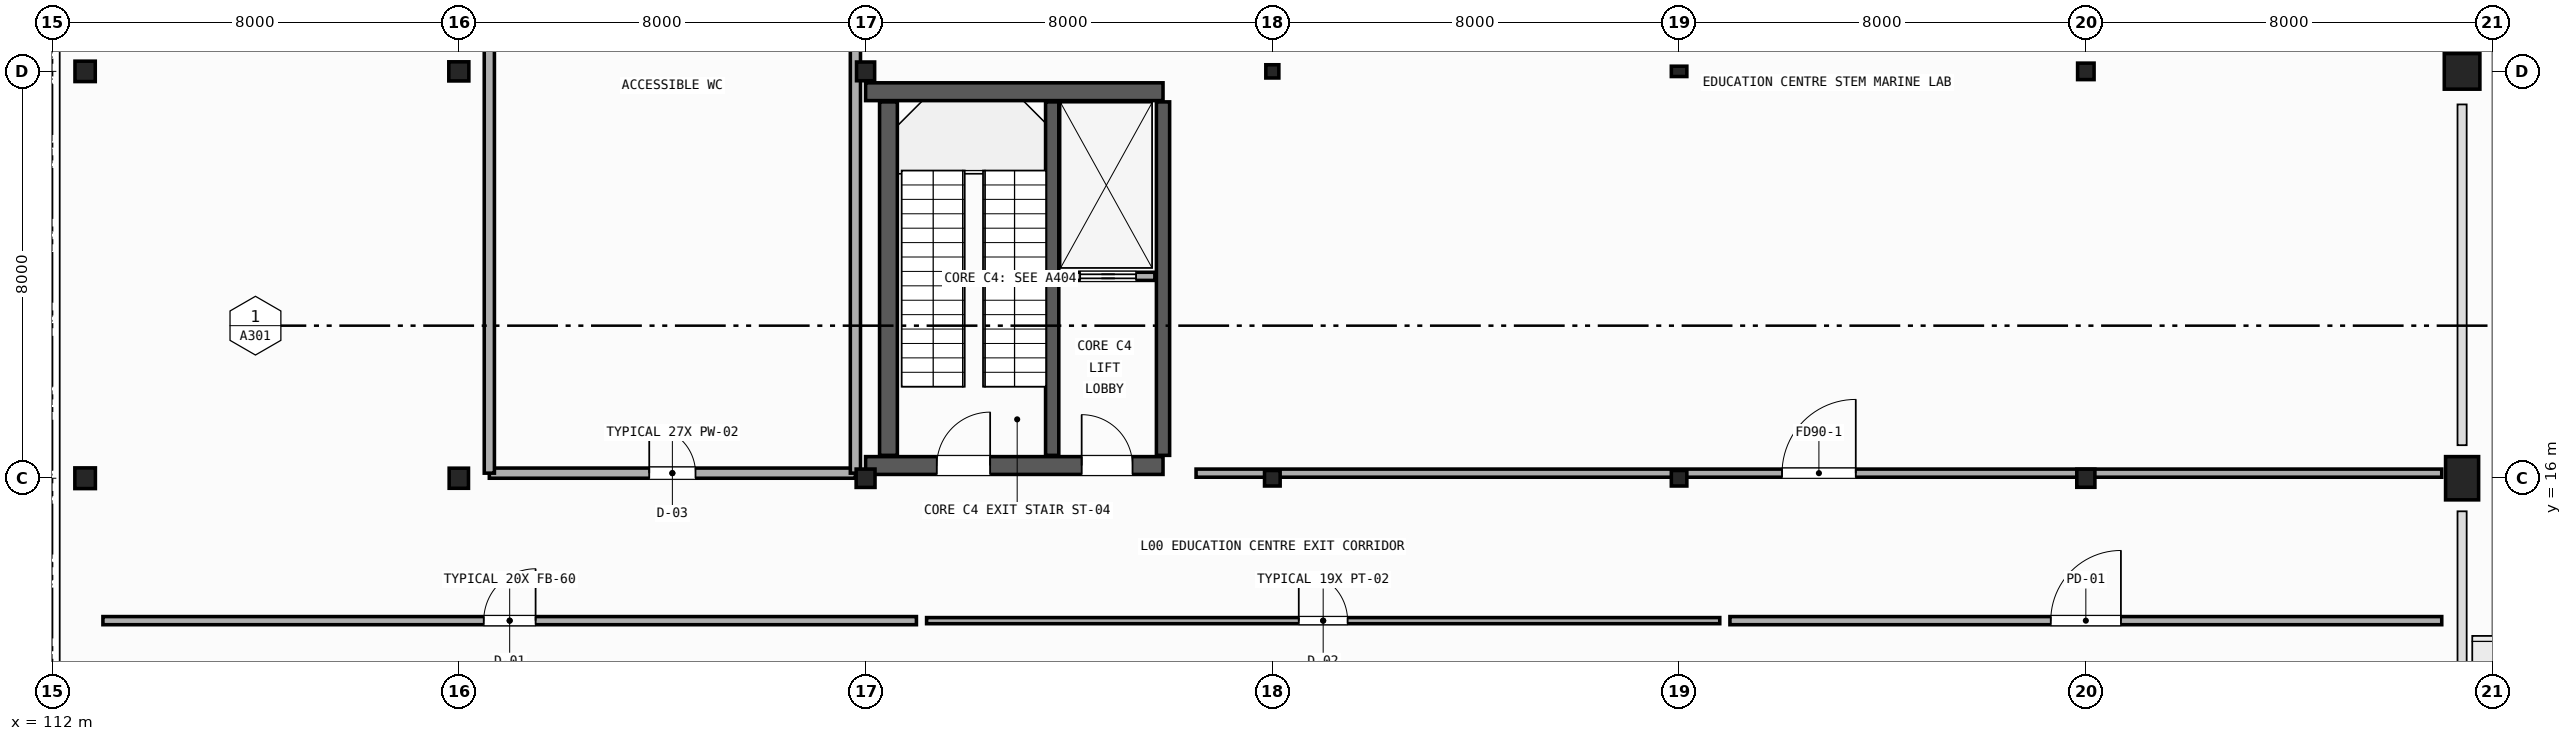
"""IFC4 building model, lengths in metres.
Left out: names, types, materials, properties, quantities, classifications, styles, units other than length and angle.
Written with IfcOpenShell. Run it as: python <this file> out.ifc"""

import sys

from ifc_helpers import new_model, si_unit, direction, frame, frame_2d, origin, origin_2d, place, context, subcontext, project, spatial, rectangle, hollow_rectangle, hollow_circle, i_section, extrude, element, fill, save


model = new_model("IFC4")
c1 = context("Model", 3, precision=1e-05, world=origin(), true_north=direction((0.0, 1.0)))
c2 = subcontext(c1, "Body", "Model", "MODEL_VIEW")
j1 = project(units=[si_unit("LENGTHUNIT", "METRE"), si_unit("PLANEANGLEUNIT", "RADIAN")], contexts=[c1])
p1 = place(None, origin())
s1 = spatial("IfcSite", under=j1, at=p1, CompositionType="ELEMENT")
p2 = place(p1, origin())
s2 = spatial("IfcBuilding", under=s1, at=p2, CompositionType="ELEMENT")
p3 = place(p2, origin())
s3 = spatial("IfcBuildingStorey", under=s2, at=p3, CompositionType="ELEMENT", Elevation=0.0)
p4 = place(p3, frame((112.65, 16.0, 0.0), z_axis=(0.0, 0.0, 1.0), x_axis=(1.0, 0.0, 0.0)))
e1 = element("IfcColumn", 1, at=p4, inside=s3, PredefinedType="COLUMN", context=c2, shape_type="SweptSolid", body=[
    extrude(i_section(OverallWidth=0.404, OverallDepth=0.407, WebThickness=0.027, FlangeThickness=0.044, FilletRadius=0.015, at=origin_2d()), origin(), (0.0, 0.0, 1.0), 5.12),
])
p5 = place(p3, frame((112.65, 24.0, 0.0), z_axis=(0.0, 0.0, 1.0), x_axis=(0.0, 1.0, 0.0)))
e2 = element("IfcColumn", 2, at=p5, inside=s3, PredefinedType="COLUMN", context=c2, shape_type="SweptSolid", body=[
    extrude(i_section(OverallWidth=0.401, OverallDepth=0.399, WebThickness=0.025, FlangeThickness=0.04, FilletRadius=0.015, at=origin_2d()), origin(), (0.0, 0.0, 1.0), 5.12),
])
p6 = place(p3, frame((120.0, 16.0, 0.0), z_axis=(0.0, 0.0, 1.0), x_axis=(0.0, 1.0, 0.0)))
e3 = element("IfcColumn", 3, at=p6, inside=s3, PredefinedType="COLUMN", context=c2, shape_type="SweptSolid", body=[
    extrude(i_section(OverallWidth=0.395, OverallDepth=0.38, WebThickness=0.019, FlangeThickness=0.03, FilletRadius=0.015, at=origin_2d()), origin(), (0.0, 0.0, 1.0), 5.12),
])
p7 = place(p3, frame((120.0, 24.0, 0.0), z_axis=(0.0, 0.0, 1.0), x_axis=(1.0, 0.0, 0.0)))
e4 = element("IfcColumn", 4, at=p7, inside=s3, PredefinedType="COLUMN", context=c2, shape_type="SweptSolid", body=[
    extrude(i_section(OverallWidth=0.394, OverallDepth=0.376, WebThickness=0.017, FlangeThickness=0.028, FilletRadius=0.015, at=origin_2d()), origin(), (0.0, 0.0, 1.0), 5.12),
])
p8 = place(p3, frame((128.0, 16.0, 0.0), z_axis=(0.0, 0.0, 1.0), x_axis=(1.0, 0.0, 0.0)))
e5 = element("IfcColumn", 5, at=p8, inside=s3, PredefinedType="COLUMN", context=c2, shape_type="SweptSolid", body=[
    extrude(i_section(OverallWidth=0.371, OverallDepth=0.361, WebThickness=0.012, FlangeThickness=0.02, FilletRadius=0.015, at=origin_2d()), origin(), (0.0, 0.0, 1.0), 5.12),
])
p9 = place(p3, frame((128.0, 24.0, 0.0), z_axis=(0.0, 0.0, 1.0), x_axis=(0.0, 1.0, 0.0)))
e6 = element("IfcColumn", 6, at=p9, inside=s3, PredefinedType="COLUMN", context=c2, shape_type="SweptSolid", body=[
    extrude(i_section(OverallWidth=0.368, OverallDepth=0.356, WebThickness=0.011, FlangeThickness=0.018, FilletRadius=0.015, at=origin_2d()), origin(), (0.0, 0.0, 1.0), 5.12),
])
p10 = place(p3, frame((136.0, 16.0, 0.0), z_axis=(0.0, 0.0, 1.0), x_axis=(0.0, 1.0, 0.0)))
e7 = element("IfcColumn", 7, at=p10, inside=s3, PredefinedType="COLUMN", context=c2, shape_type="SweptSolid", body=[
    extrude(i_section(OverallWidth=0.305, OverallDepth=0.307, WebThickness=0.01, FlangeThickness=0.015, FilletRadius=0.013, at=origin_2d()), origin(), (0.0, 0.0, 1.0), 5.12),
])
p11 = place(p3, frame((136.0, 24.0, 0.0), z_axis=(0.0, 0.0, 1.0), x_axis=(1.0, 0.0, 0.0)))
e8 = element("IfcColumn", 8, at=p11, inside=s3, PredefinedType="COLUMN", context=c2, shape_type="SweptSolid", body=[
    extrude(i_section(OverallWidth=0.256, OverallDepth=0.26, WebThickness=0.011, FlangeThickness=0.017, FilletRadius=0.011, at=origin_2d()), origin(), (0.0, 0.0, 1.0), 5.12),
])
p12 = place(p3, frame((144.0, 16.0, 0.0), z_axis=(0.0, 0.0, 1.0), x_axis=(1.0, 0.0, 0.0)))
e9 = element("IfcColumn", 9, at=p12, inside=s3, PredefinedType="COLUMN", context=c2, shape_type="SweptSolid", body=[
    extrude(hollow_rectangle(XDim=0.305, YDim=0.305, WallThickness=0.012, InnerFilletRadius=0.012, OuterFilletRadius=0.024, at=origin_2d()), origin(), (0.0, 0.0, 1.0), 5.12),
])
p13 = place(p3, frame((144.0, 24.0, 0.0), z_axis=(0.0, 0.0, 1.0), x_axis=(0.0, 1.0, 0.0)))
e10 = element("IfcColumn", 10, at=p13, inside=s3, PredefinedType="COLUMN", context=c2, shape_type="SweptSolid", body=[
    extrude(hollow_rectangle(XDim=0.203, YDim=0.305, WallThickness=0.009, InnerFilletRadius=0.009, OuterFilletRadius=0.018, at=origin_2d()), origin(), (0.0, 0.0, 1.0), 5.12),
])
p14 = place(p3, frame((152.0, 16.0, 0.0), z_axis=(0.0, 0.0, 1.0), x_axis=(0.0, 1.0, 0.0)))
e11 = element("IfcColumn", 11, at=p14, inside=s3, PredefinedType="COLUMN", context=c2, shape_type="SweptSolid", body=[
    extrude(hollow_circle(Radius=0.178, WallThickness=0.012, at=origin_2d()), origin(), (0.0, 0.0, 1.0), 5.12),
])
p15 = place(p3, frame((152.0, 24.0, 0.0), z_axis=(0.0, 0.0, 1.0), x_axis=(1.0, 0.0, 0.0)))
e12 = element("IfcColumn", 12, at=p15, inside=s3, PredefinedType="COLUMN", context=c2, shape_type="SweptSolid", body=[
    extrude(hollow_circle(Radius=0.162, WallThickness=0.012, at=origin_2d()), origin(), (0.0, 0.0, 1.0), 5.12),
])
p16 = place(p3, frame((159.4, 16.0, 0.0), z_axis=(0.0, 0.0, 1.0), x_axis=(1.0, 0.0, 0.0)))
e13 = element("IfcColumn", 13, at=p16, inside=s3, PredefinedType="PILASTER", context=c2, shape_type="SweptSolid", body=[
    extrude(rectangle(XDim=0.65, YDim=0.85, at=origin_2d()), origin(), (0.0, 0.0, 1.0), 5.12),
])
p17 = place(p3, frame((159.4, 24.0, 0.0), z_axis=(0.0, 0.0, 1.0), x_axis=(0.0, 1.0, 0.0)))
e14 = element("IfcColumn", 14, at=p17, inside=s3, PredefinedType="COLUMN", context=c2, shape_type="SweptSolid", body=[
    extrude(rectangle(XDim=0.7, YDim=0.7, at=origin_2d()), origin(), (0.0, 0.0, 1.0), 5.12),
])
p18 = place(p3, frame((128.0, 16.25, 0.0), z_axis=(0.0, 0.0, 1.0), x_axis=(1.0, 0.0, 0.0)))
e15 = element("IfcWall", 15, at=p18, inside=s3, PredefinedType="SHEAR", context=c2, shape_type="SweptSolid", body=[
    extrude(rectangle(XDim=5.85, YDim=0.35, at=frame_2d((2.925, 0.0))), origin(), (0.0, 0.0, 1.0), 5.11),
])
p19 = place(p18, frame((1.4, 0.0, 0.0)))
e16 = element("IfcOpeningElement", 16, at=p19, cuts=e15, PredefinedType="OPENING", context=c2, shape_type="SweptSolid", body=[
    extrude(rectangle(XDim=1.05, YDim=2.1, at=frame_2d((0.525, 1.05))), frame((0.0, 0.185, 0.0), z_axis=(0.0, -1.0, 0.0), x_axis=(1.0, 0.0, 0.0)), (0.0, 0.0, 1.0), 0.37),
])
p20 = place(p18, frame((4.25, 0.0, 0.0)))
e17 = element("IfcOpeningElement", 17, at=p20, cuts=e15, PredefinedType="OPENING", context=c2, shape_type="SweptSolid", body=[
    extrude(rectangle(XDim=1.0, YDim=2.15, at=frame_2d((0.5, 1.075))), frame((0.0, 0.185, 0.0), z_axis=(0.0, -1.0, 0.0), x_axis=(1.0, 0.0, 0.0)), (0.0, 0.0, 1.0), 0.37),
])
p21 = place(p3, frame((128.0, 23.6, 0.0), z_axis=(0.0, 0.0, 1.0), x_axis=(1.0, 0.0, 0.0)))
e18 = element("IfcWall", 18, at=p21, inside=s3, PredefinedType="SHEAR", context=c2, shape_type="SweptSolid", body=[
    extrude(rectangle(XDim=5.85, YDim=0.35, at=frame_2d((2.925, 0.0))), origin(), (0.0, 0.0, 1.0), 5.11),
])
p22 = place(p3, frame((128.45, 16.45, 0.0), z_axis=(0.0, 0.0, 1.0), x_axis=(0.0, 1.0, 0.0)))
e19 = element("IfcWall", 19, at=p22, inside=s3, PredefinedType="SHEAR", context=c2, shape_type="SweptSolid", body=[
    extrude(rectangle(XDim=6.95, YDim=0.35, at=frame_2d((3.475, 0.0))), origin(), (0.0, 0.0, 1.0), 5.11),
])
for number, where, z_axis, x_axis in (
    (20, (133.85, 16.45, 0.0), (0.0, 0.0, 1.0), (0.0, 1.0, 0.0)),
    (21, (131.67, 16.45, 0.0), (0.0, 0.0, 1.0), (0.0, 1.0, 0.0)),
):
    element("IfcWall", number, at=place(p3, frame(where, z_axis=z_axis, x_axis=x_axis)), inside=s3, PredefinedType="SHEAR", context=c2, shape_type="SweptSolid", body=[
        extrude(rectangle(XDim=6.95, YDim=0.26, at=frame_2d((3.475, 0.0))), origin(), (0.0, 0.0, 1.0), 5.11),
    ])
p23 = place(p3, frame((131.85, 19.97, 0.0), z_axis=(0.0, 0.0, 1.0), x_axis=(1.0, 0.0, 0.0)))
e22 = element("IfcWall", 22, at=p23, inside=s3, PredefinedType="PARTITIONING", context=c2, shape_type="SweptSolid", body=[
    extrude(rectangle(XDim=1.84, YDim=0.16, at=frame_2d((0.92, 0.0))), origin(), (0.0, 0.0, 1.0), 3.6),
])
p24 = place(p23, frame((0.37, 0.0, 0.0)))
e23 = element("IfcOpeningElement", 23, at=p24, cuts=e22, PredefinedType="OPENING", context=c2, shape_type="SweptSolid", body=[
    extrude(rectangle(XDim=1.1, YDim=2.15, at=frame_2d((0.55, 1.075))), frame((0.0, 0.09, 0.0), z_axis=(0.0, -1.0, 0.0), x_axis=(1.0, 0.0, 0.0)), (0.0, 0.0, 1.0), 0.18),
])
p25 = place(p3, frame((113.0, 13.2, 0.0), z_axis=(0.0, 0.0, 1.0), x_axis=(1.0, 0.0, 0.0)))
e24 = element("IfcWall", 24, at=p25, inside=s3, PredefinedType="PARTITIONING", context=c2, shape_type="SweptSolid", body=[
    extrude(rectangle(XDim=16.0, YDim=0.16, at=frame_2d((8.0, 0.0))), origin(), (0.0, 0.0, 1.0), 4.29),
])
p26 = place(p25, frame((7.49, 0.0, 0.0)))
e25 = element("IfcOpeningElement", 25, at=p26, cuts=e24, PredefinedType="OPENING", context=c2, shape_type="SweptSolid", body=[
    extrude(rectangle(XDim=1.02, YDim=2.15, at=frame_2d((0.51, 1.075))), frame((0.0, 0.09, 0.0), z_axis=(0.0, -1.0, 0.0), x_axis=(1.0, 0.0, 0.0)), (0.0, 0.0, 1.0), 0.18),
])
p27 = place(p3, frame((129.2, 13.2, 0.0), z_axis=(0.0, 0.0, 1.0), x_axis=(1.0, 0.0, 0.0)))
e26 = element("IfcWall", 26, at=p27, inside=s3, PredefinedType="PARTITIONING", context=c2, shape_type="SweptSolid", body=[
    extrude(rectangle(XDim=15.6, YDim=0.12, at=frame_2d((7.8, 0.0))), origin(), (0.0, 0.0, 1.0), 4.29),
])
p28 = place(p27, frame((7.32, 0.0, 0.0)))
e27 = element("IfcOpeningElement", 27, at=p28, cuts=e26, PredefinedType="OPENING", context=c2, shape_type="SweptSolid", body=[
    extrude(rectangle(XDim=0.96, YDim=2.1, at=frame_2d((0.48, 1.05))), frame((0.0, 0.07, 0.0), z_axis=(0.0, -1.0, 0.0), x_axis=(1.0, 0.0, 0.0)), (0.0, 0.0, 1.0), 0.14),
])
p29 = place(p3, frame((145.0, 13.2, 0.0), z_axis=(0.0, 0.0, 1.0), x_axis=(1.0, 0.0, 0.0)))
e28 = element("IfcWall", 28, at=p29, inside=s3, PredefinedType="PARTITIONING", context=c2, shape_type="SweptSolid", body=[
    extrude(rectangle(XDim=14.0, YDim=0.16, at=frame_2d((7.0, 0.0))), origin(), (0.0, 0.0, 1.0), 4.29),
])
p30 = place(p29, frame((6.31, 0.0, 0.0)))
e29 = element("IfcOpeningElement", 29, at=p30, cuts=e28, PredefinedType="OPENING", context=c2, shape_type="SweptSolid", body=[
    extrude(rectangle(XDim=1.38, YDim=2.25, at=frame_2d((0.69, 1.125))), frame((0.0, 0.09, 0.0), z_axis=(0.0, -1.0, 0.0), x_axis=(1.0, 0.0, 0.0)), (0.0, 0.0, 1.0), 0.18),
])
p31 = place(p3, frame((120.6, 16.1, 0.0), z_axis=(0.0, 0.0, 1.0), x_axis=(1.0, 0.0, 0.0)))
e30 = element("IfcWall", 30, at=p31, inside=s3, PredefinedType="PLUMBINGWALL", context=c2, shape_type="SweptSolid", body=[
    extrude(rectangle(XDim=7.2, YDim=0.2, at=frame_2d((3.6, 0.0))), origin(), (0.0, 0.0, 1.0), 4.29),
])
p32 = place(p31, frame((3.145, 0.0, 0.0)))
e31 = element("IfcOpeningElement", 31, at=p32, cuts=e30, PredefinedType="OPENING", context=c2, shape_type="SweptSolid", body=[
    extrude(rectangle(XDim=0.91, YDim=2.1, at=frame_2d((0.455, 1.05))), frame((0.0, 0.11, 0.0), z_axis=(0.0, -1.0, 0.0), x_axis=(1.0, 0.0, 0.0)), (0.0, 0.0, 1.0), 0.22),
])
for number, where, z_axis, x_axis in (
    (32, (120.6, 16.1, 0.0), (0.0, 0.0, 1.0), (0.0, 1.0, 0.0)),
    (33, (127.8, 16.1, 0.0), (0.0, 0.0, 1.0), (0.0, 1.0, 0.0)),
):
    element("IfcWall", number, at=place(p3, frame(where, z_axis=z_axis, x_axis=x_axis)), inside=s3, PredefinedType="PLUMBINGWALL", context=c2, shape_type="SweptSolid", body=[
        extrude(rectangle(XDim=15.25, YDim=0.2, at=frame_2d((7.625, 0.0))), origin(), (0.0, 0.0, 1.0), 4.29),
    ])
p33 = place(p3, frame((134.5, 16.1, 0.0), z_axis=(0.0, 0.0, 1.0), x_axis=(1.0, 0.0, 0.0)))
e34 = element("IfcWall", 34, at=p33, inside=s3, PredefinedType="PARTITIONING", context=c2, shape_type="SweptSolid", body=[
    extrude(rectangle(XDim=24.5, YDim=0.16, at=frame_2d((12.25, 0.0))), origin(), (0.0, 0.0, 1.0), 4.29),
])
p34 = place(p33, frame((11.525, 0.0, 0.0)))
e35 = element("IfcOpeningElement", 35, at=p34, cuts=e34, PredefinedType="OPENING", context=c2, shape_type="SweptSolid", body=[
    extrude(rectangle(XDim=1.45, YDim=2.25, at=frame_2d((0.725, 1.125))), frame((0.0, 0.09, 0.0), z_axis=(0.0, -1.0, 0.0), x_axis=(1.0, 0.0, 0.0)), (0.0, 0.0, 1.0), 0.18),
])
p35 = place(p24, origin())
e36 = element("IfcDoor", 36, at=p35, inside=s3, OperationType="SLIDING_TO_LEFT", PredefinedType="DOOR", context=c2, shape_type="SweptSolid", body=[
    extrude(rectangle(XDim=1.1, YDim=2.15, at=frame_2d((0.55, 1.075))), frame((0.0, 0.025, 0.0), z_axis=(0.0, -1.0, 0.0), x_axis=(1.0, 0.0, 0.0)), (0.0, 0.0, 1.0), 0.05),
])
fill(e23, e36)
p36 = place(p19, origin())
e37 = element("IfcDoor", 37, at=p36, inside=s3, OperationType="SINGLE_SWING_RIGHT", PredefinedType="DOOR", context=c2, shape_type="SweptSolid", body=[
    extrude(rectangle(XDim=1.05, YDim=2.1, at=frame_2d((0.525, 1.05))), frame((0.0, 0.025, 0.0), z_axis=(0.0, -1.0, 0.0), x_axis=(1.0, 0.0, 0.0)), (0.0, 0.0, 1.0), 0.05),
])
fill(e16, e37)
p37 = place(p20, origin())
e38 = element("IfcDoor", 38, at=p37, inside=s3, OperationType="SINGLE_SWING_LEFT", PredefinedType="DOOR", context=c2, shape_type="SweptSolid", body=[
    extrude(rectangle(XDim=1.0, YDim=2.15, at=frame_2d((0.5, 1.075))), frame((0.0, 0.025, 0.0), z_axis=(0.0, -1.0, 0.0), x_axis=(1.0, 0.0, 0.0)), (0.0, 0.0, 1.0), 0.05),
])
fill(e17, e38)
p38 = place(p26, origin())
e39 = element("IfcDoor", 39, at=p38, inside=s3, OperationType="SINGLE_SWING_RIGHT", PredefinedType="DOOR", context=c2, shape_type="SweptSolid", body=[
    extrude(rectangle(XDim=1.02, YDim=2.15, at=frame_2d((0.51, 1.075))), frame((0.0, 0.025, 0.0), z_axis=(0.0, -1.0, 0.0), x_axis=(1.0, 0.0, 0.0)), (0.0, 0.0, 1.0), 0.05),
])
fill(e25, e39)
p39 = place(p28, origin())
e40 = element("IfcDoor", 40, at=p39, inside=s3, OperationType="SINGLE_SWING_LEFT", PredefinedType="DOOR", context=c2, shape_type="SweptSolid", body=[
    extrude(rectangle(XDim=0.96, YDim=2.1, at=frame_2d((0.48, 1.05))), frame((0.0, 0.025, 0.0), z_axis=(0.0, -1.0, 0.0), x_axis=(1.0, 0.0, 0.0)), (0.0, 0.0, 1.0), 0.05),
])
fill(e27, e40)
p40 = place(p30, origin())
e41 = element("IfcDoor", 41, at=p40, inside=s3, OperationType="SINGLE_SWING_RIGHT", PredefinedType="DOOR", context=c2, shape_type="SweptSolid", body=[
    extrude(rectangle(XDim=1.38, YDim=2.25, at=frame_2d((0.69, 1.125))), frame((0.0, 0.025, 0.0), z_axis=(0.0, -1.0, 0.0), x_axis=(1.0, 0.0, 0.0)), (0.0, 0.0, 1.0), 0.05),
])
fill(e29, e41)
p41 = place(p32, origin())
e42 = element("IfcDoor", 42, at=p41, inside=s3, OperationType="SINGLE_SWING_LEFT", PredefinedType="DOOR", context=c2, shape_type="SweptSolid", body=[
    extrude(rectangle(XDim=0.91, YDim=2.1, at=frame_2d((0.455, 1.05))), frame((0.0, 0.025, 0.0), z_axis=(0.0, -1.0, 0.0), x_axis=(1.0, 0.0, 0.0)), (0.0, 0.0, 1.0), 0.05),
])
fill(e31, e42)
p42 = place(p34, origin())
e43 = element("IfcDoor", 43, at=p42, inside=s3, OperationType="SINGLE_SWING_RIGHT", PredefinedType="DOOR", context=c2, shape_type="SweptSolid", body=[
    extrude(rectangle(XDim=1.45, YDim=2.25, at=frame_2d((0.725, 1.125))), frame((0.0, 0.025, 0.0), z_axis=(0.0, -1.0, 0.0), x_axis=(1.0, 0.0, 0.0)), (0.0, 0.0, 1.0), 0.05),
])
fill(e35, e43)
save(model, sys.argv[1])
